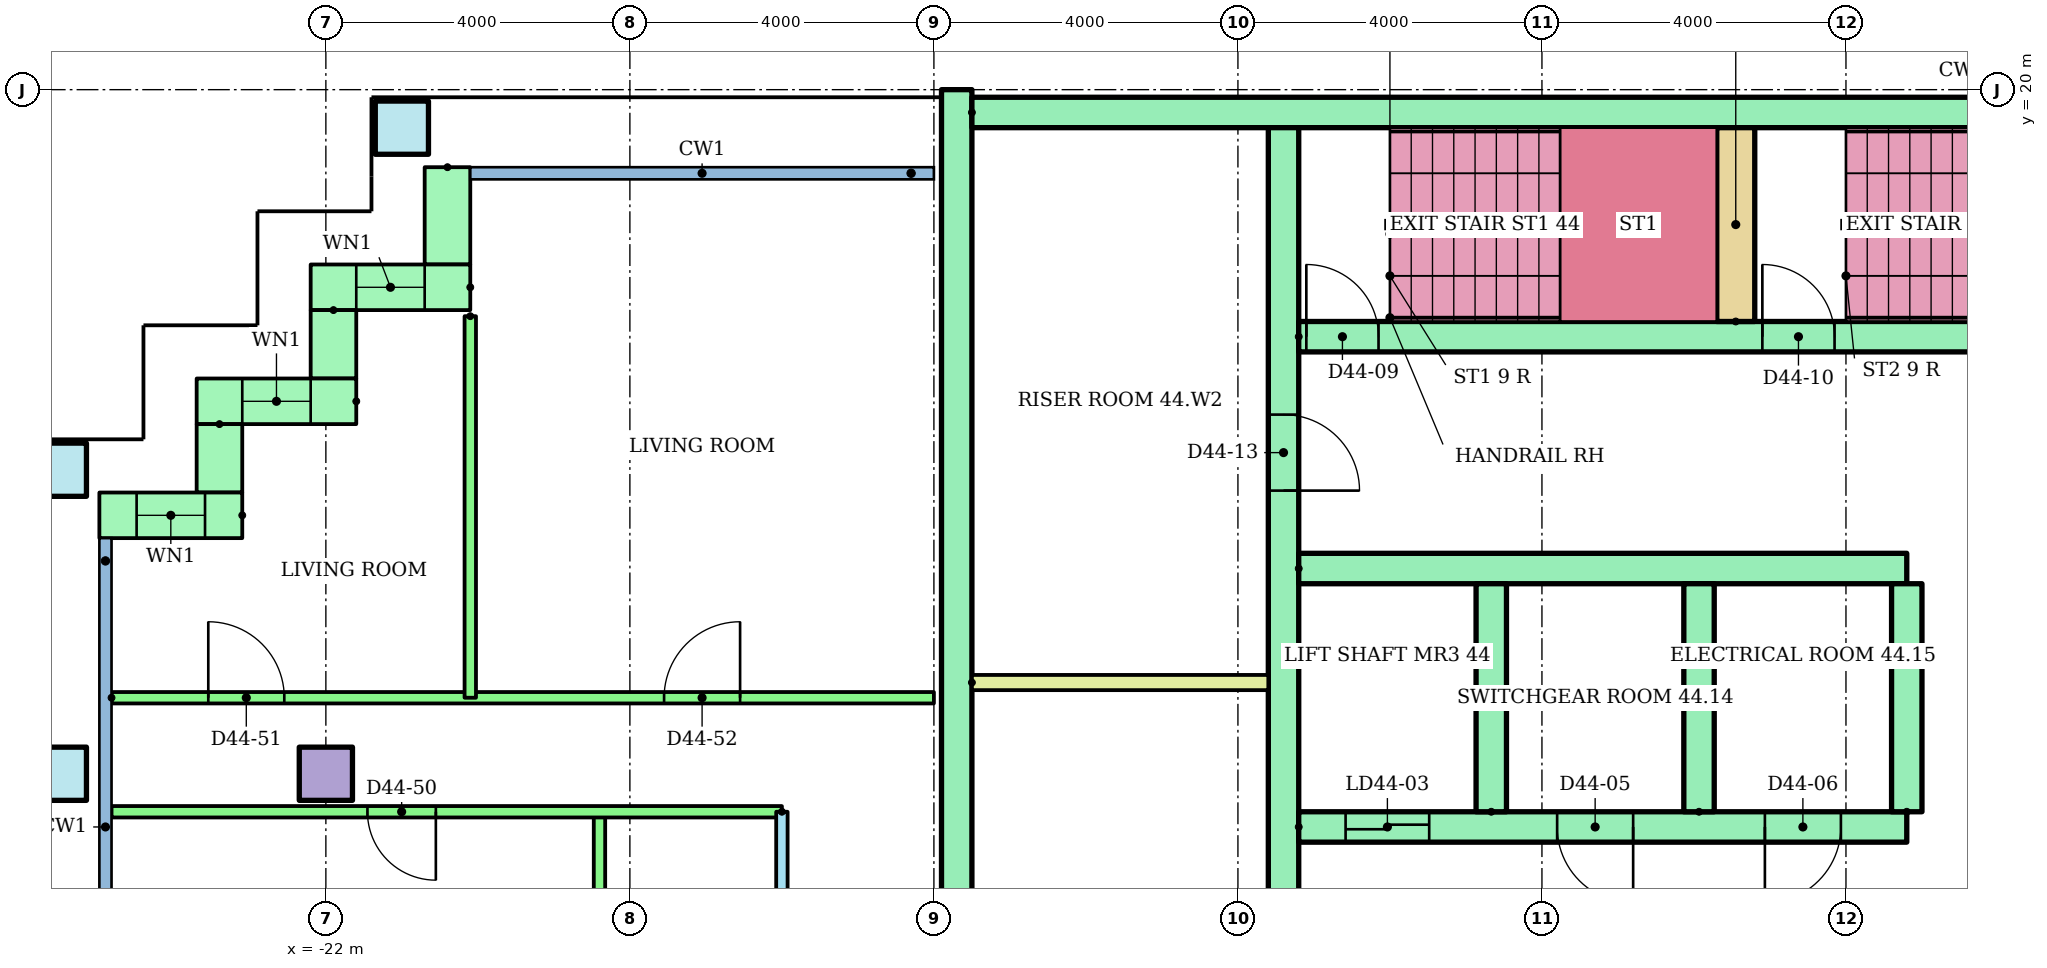
"""IFC4 building model, lengths in metres.
Left out: names, types, materials, properties, quantities, classifications, styles, units other than length and angle.
Written with IfcOpenShell. Run it as: python <this file> out.ifc"""

import sys

from ifc_helpers import new_model, si_unit, direction, frame, frame_2d, origin, origin_2d, place, context, subcontext, project, spatial, rectangle, hollow_rectangle, extrude, element, fill, save


model = new_model("IFC4")
c1 = context("Model", 3, precision=1e-05, world=origin(), true_north=direction((0.0, 1.0)))
c2 = subcontext(c1, "Body", "Model", "MODEL_VIEW")
j1 = project(units=[si_unit("LENGTHUNIT", "METRE"), si_unit("PLANEANGLEUNIT", "RADIAN")], contexts=[c1])
p1 = place(None, origin())
s1 = spatial("IfcSite", under=j1, at=p1, CompositionType="ELEMENT")
p2 = place(p1, origin())
s2 = spatial("IfcBuilding", under=s1, at=p2, CompositionType="ELEMENT")
p3 = place(p2, frame((0.0, 0.0, 171.7)))
s3 = spatial("IfcBuildingStorey", under=s2, at=p3, CompositionType="ELEMENT", Elevation=171.7)
p4 = place(p3, frame((-25.5, 11.0, 0.0)))
e1 = element("IfcColumn", 1, at=p4, inside=s3, PredefinedType="COLUMN", context=c2, shape_type="SweptSolid", body=[
    extrude(hollow_rectangle(XDim=0.7, YDim=0.7, WallThickness=0.036, at=origin_2d()), origin(), (0.0, 0.0, 1.0), 3.2),
])
p5 = place(p3, frame((-22.0, 11.0, 0.0)))
e2 = element("IfcColumn", 2, at=p5, inside=s3, PredefinedType="COLUMN", context=c2, shape_type="SweptSolid", body=[
    extrude(rectangle(XDim=0.7, YDim=0.7, at=origin_2d()), origin(), (0.0, 0.0, 1.0), 3.2),
])
for number, where in (
    (3, (-25.5, 15.0, 0.0)),
    (4, (-21.0, 19.5, 0.0)),
):
    element("IfcColumn", number, at=place(p3, frame(where)), inside=s3, PredefinedType="COLUMN", context=c2, shape_type="SweptSolid", body=[
        extrude(hollow_rectangle(XDim=0.7, YDim=0.7, WallThickness=0.036, at=origin_2d()), origin(), (0.0, 0.0, 1.0), 3.2),
    ])
p6 = place(p3, frame((-20.4, 18.98, 0.0), z_axis=(0.0, 0.0, 1.0), x_axis=(0.0, -1.0, 0.0)))
e5 = element("IfcWall", 5, at=p6, inside=s3, PredefinedType="STANDARD", context=c2, shape_type="SweptSolid", body=[
    extrude(rectangle(XDim=1.28, YDim=0.6, at=frame_2d((0.64, 0.0))), origin(), (0.0, 0.0, 1.0), 2.92),
])
p7 = place(p3, frame((-20.1, 17.4, 0.0), z_axis=(0.0, 0.0, 1.0), x_axis=(-1.0, 0.0, 0.0)))
e6 = element("IfcWall", 6, at=p7, inside=s3, PredefinedType="STANDARD", context=c2, shape_type="SweptSolid", body=[
    extrude(rectangle(XDim=2.1, YDim=0.6, at=frame_2d((1.05, 0.0))), origin(), (0.0, 0.0, 1.0), 2.92),
])
p8 = place(p7, frame((0.6, 0.0, 0.9)))
e7 = element("IfcOpeningElement", 7, at=p8, cuts=e6, PredefinedType="OPENING", context=c2, shape_type="SweptSolid", body=[
    extrude(rectangle(XDim=0.9, YDim=1.5, at=frame_2d((0.45, 0.75))), frame((0.0, 0.31, 0.0), z_axis=(0.0, -1.0, 0.0), x_axis=(1.0, 0.0, 0.0)), (0.0, 0.0, 1.0), 0.62),
])
p9 = place(p3, frame((-21.9, 17.1, 0.0), z_axis=(0.0, 0.0, 1.0), x_axis=(0.0, -1.0, 0.0)))
e8 = element("IfcWall", 8, at=p9, inside=s3, PredefinedType="STANDARD", context=c2, shape_type="SweptSolid", body=[
    extrude(rectangle(XDim=0.9, YDim=0.6, at=frame_2d((0.45, 0.0))), origin(), (0.0, 0.0, 1.0), 2.92),
])
p10 = place(p3, frame((-21.6, 15.9, 0.0), z_axis=(0.0, 0.0, 1.0), x_axis=(-1.0, 0.0, 0.0)))
e9 = element("IfcWall", 9, at=p10, inside=s3, PredefinedType="STANDARD", context=c2, shape_type="SweptSolid", body=[
    extrude(rectangle(XDim=2.1, YDim=0.6, at=frame_2d((1.05, 0.0))), origin(), (0.0, 0.0, 1.0), 2.92),
])
p11 = place(p10, frame((0.6, 0.0, 0.9)))
e10 = element("IfcOpeningElement", 10, at=p11, cuts=e9, PredefinedType="OPENING", context=c2, shape_type="SweptSolid", body=[
    extrude(rectangle(XDim=0.9, YDim=1.5, at=frame_2d((0.45, 0.75))), frame((0.0, 0.31, 0.0), z_axis=(0.0, -1.0, 0.0), x_axis=(1.0, 0.0, 0.0)), (0.0, 0.0, 1.0), 0.62),
])
p12 = place(p3, frame((-23.4, 15.6, 0.0), z_axis=(0.0, 0.0, 1.0), x_axis=(0.0, -1.0, 0.0)))
e11 = element("IfcWall", 11, at=p12, inside=s3, PredefinedType="STANDARD", context=c2, shape_type="SweptSolid", body=[
    extrude(rectangle(XDim=0.9, YDim=0.6, at=frame_2d((0.45, 0.0))), origin(), (0.0, 0.0, 1.0), 2.92),
])
p13 = place(p3, frame((-23.1, 14.4, 0.0), z_axis=(0.0, 0.0, 1.0), x_axis=(-1.0, 0.0, 0.0)))
e12 = element("IfcWall", 12, at=p13, inside=s3, PredefinedType="STANDARD", context=c2, shape_type="SweptSolid", body=[
    extrude(rectangle(XDim=1.88, YDim=0.6, at=frame_2d((0.94, 0.0))), origin(), (0.0, 0.0, 1.0), 2.92),
])
p14 = place(p13, frame((0.49, 0.0, 0.9)))
e13 = element("IfcOpeningElement", 13, at=p14, cuts=e12, PredefinedType="OPENING", context=c2, shape_type="SweptSolid", body=[
    extrude(rectangle(XDim=0.9, YDim=1.5, at=frame_2d((0.45, 0.75))), frame((0.0, 0.31, 0.0), z_axis=(0.0, -1.0, 0.0), x_axis=(1.0, 0.0, 0.0)), (0.0, 0.0, 1.0), 0.62),
])
p15 = place(p3, frame((-13.7, 3.0, 0.0), z_axis=(0.0, 0.0, 1.0), x_axis=(0.0, 1.0, 0.0)))
e14 = element("IfcWall", 14, at=p15, inside=s3, PredefinedType="SHEAR", context=c2, shape_type="SweptSolid", body=[
    extrude(rectangle(XDim=17.0, YDim=0.4, at=frame_2d((8.5, 0.0))), origin(), (0.0, 0.0, 1.0), 2.92),
])
p16 = place(p3, frame((-13.5, 19.7, 0.0)))
e15 = element("IfcWall", 15, at=p16, inside=s3, PredefinedType="SHEAR", context=c2, shape_type="SweptSolid", body=[
    extrude(rectangle(XDim=27.0, YDim=0.4, at=frame_2d((13.5, 0.0))), origin(), (0.0, 0.0, 1.0), 2.92),
])
p17 = place(p3, frame((-9.4, 6.8, 0.0), z_axis=(0.0, 0.0, 1.0), x_axis=(0.0, 1.0, 0.0)))
e16 = element("IfcWall", 16, at=p17, inside=s3, PredefinedType="SHEAR", context=c2, shape_type="SweptSolid", body=[
    extrude(rectangle(XDim=12.7, YDim=0.4, at=frame_2d((6.35, 0.0))), origin(), (0.0, 0.0, 1.0), 2.92),
])
p18 = place(p17, frame((1.15, 0.0, 0.0)))
e17 = element("IfcOpeningElement", 17, at=p18, cuts=e16, PredefinedType="OPENING", context=c2, shape_type="SweptSolid", body=[
    extrude(rectangle(XDim=1.0, YDim=2.1, at=frame_2d((0.5, 1.05))), frame((0.0, 0.21, 0.0), z_axis=(0.0, -1.0, 0.0), x_axis=(1.0, 0.0, 0.0)), (0.0, 0.0, 1.0), 0.42),
])
p19 = place(p17, frame((7.925, 0.0, 0.0)))
e18 = element("IfcOpeningElement", 18, at=p19, cuts=e16, PredefinedType="OPENING", context=c2, shape_type="SweptSolid", body=[
    extrude(rectangle(XDim=1.0, YDim=2.1, at=frame_2d((0.5, 1.05))), frame((0.0, 0.21, 0.0), z_axis=(0.0, -1.0, 0.0), x_axis=(1.0, 0.0, 0.0)), (0.0, 0.0, 1.0), 0.42),
])
p20 = place(p3, frame((-9.2, 10.3, 0.0)))
e19 = element("IfcWall", 19, at=p20, inside=s3, PredefinedType="SHEAR", context=c2, shape_type="SweptSolid", body=[
    extrude(rectangle(XDim=8.0, YDim=0.4, at=frame_2d((4.0, 0.0))), origin(), (0.0, 0.0, 1.0), 2.92),
])
p21 = place(p20, frame((0.617, 0.0, 0.0)))
e20 = element("IfcOpeningElement", 20, at=p21, cuts=e19, PredefinedType="OPENING", context=c2, shape_type="SweptSolid", body=[
    extrude(rectangle(XDim=1.1, YDim=2.1, at=frame_2d((0.55, 1.05))), frame((0.0, 0.21, 0.0), z_axis=(0.0, -1.0, 0.0), x_axis=(1.0, 0.0, 0.0)), (0.0, 0.0, 1.0), 0.42),
])
p22 = place(p20, frame((3.4, 0.0, 0.0)))
e21 = element("IfcOpeningElement", 21, at=p22, cuts=e19, PredefinedType="OPENING", context=c2, shape_type="SweptSolid", body=[
    extrude(rectangle(XDim=1.0, YDim=2.1, at=frame_2d((0.5, 1.05))), frame((0.0, 0.21, 0.0), z_axis=(0.0, -1.0, 0.0), x_axis=(1.0, 0.0, 0.0)), (0.0, 0.0, 1.0), 0.42),
])
p23 = place(p20, frame((6.133, 0.0, 0.0)))
e22 = element("IfcOpeningElement", 22, at=p23, cuts=e19, PredefinedType="OPENING", context=c2, shape_type="SweptSolid", body=[
    extrude(rectangle(XDim=1.0, YDim=2.1, at=frame_2d((0.5, 1.05))), frame((0.0, 0.21, 0.0), z_axis=(0.0, -1.0, 0.0), x_axis=(1.0, 0.0, 0.0)), (0.0, 0.0, 1.0), 0.42),
])
p24 = place(p3, frame((-9.2, 13.7, 0.0)))
e23 = element("IfcWall", 23, at=p24, inside=s3, PredefinedType="SHEAR", context=c2, shape_type="SweptSolid", body=[
    extrude(rectangle(XDim=8.0, YDim=0.4, at=frame_2d((4.0, 0.0))), origin(), (0.0, 0.0, 1.0), 2.92),
])
for number, where, z_axis, x_axis in (
    (24, (-6.667, 10.5, 0.0), (0.0, 0.0, 1.0), (0.0, 1.0, 0.0)),
    (25, (-3.933, 10.5, 0.0), (0.0, 0.0, 1.0), (0.0, 1.0, 0.0)),
    (26, (-1.2, 10.5, 0.0), (0.0, 0.0, 1.0), (0.0, 1.0, 0.0)),
):
    element("IfcWall", number, at=place(p3, frame(where, z_axis=z_axis, x_axis=x_axis)), inside=s3, PredefinedType="SHEAR", context=c2, shape_type="SweptSolid", body=[
        extrude(rectangle(XDim=3.0, YDim=0.4, at=frame_2d((1.5, 0.0))), origin(), (0.0, 0.0, 1.0), 2.92),
    ])
p25 = place(p3, frame((-9.2, 16.75, 0.0)))
e27 = element("IfcWall", 27, at=p25, inside=s3, PredefinedType="SHEAR", context=c2, shape_type="SweptSolid", body=[
    extrude(rectangle(XDim=18.4, YDim=0.4, at=frame_2d((9.2, 0.0))), origin(), (0.0, 0.0, 1.0), 2.92),
])
p26 = place(p25, frame((0.1, 0.0, 0.0)))
e28 = element("IfcOpeningElement", 28, at=p26, cuts=e27, PredefinedType="OPENING", context=c2, shape_type="SweptSolid", body=[
    extrude(rectangle(XDim=0.95, YDim=2.1, at=frame_2d((0.475, 1.05))), frame((0.0, 0.21, 0.0), z_axis=(0.0, -1.0, 0.0), x_axis=(1.0, 0.0, 0.0)), (0.0, 0.0, 1.0), 0.42),
])
p27 = place(p25, frame((6.1, 0.0, 0.0)))
e29 = element("IfcOpeningElement", 29, at=p27, cuts=e27, PredefinedType="OPENING", context=c2, shape_type="SweptSolid", body=[
    extrude(rectangle(XDim=0.95, YDim=2.1, at=frame_2d((0.475, 1.05))), frame((0.0, 0.21, 0.0), z_axis=(0.0, -1.0, 0.0), x_axis=(1.0, 0.0, 0.0)), (0.0, 0.0, 1.0), 0.42),
])
p28 = place(p25, frame((12.1, 0.0, 0.0)))
e30 = element("IfcOpeningElement", 30, at=p28, cuts=e27, PredefinedType="OPENING", context=c2, shape_type="SweptSolid", body=[
    extrude(rectangle(XDim=0.95, YDim=2.1, at=frame_2d((0.475, 1.05))), frame((0.0, 0.21, 0.0), z_axis=(0.0, -1.0, 0.0), x_axis=(1.0, 0.0, 0.0)), (0.0, 0.0, 1.0), 0.42),
])
p29 = place(p3, frame((-3.45, 16.95, 0.0), z_axis=(0.0, 0.0, 1.0), x_axis=(0.0, 1.0, 0.0)))
e31 = element("IfcWall", 31, at=p29, inside=s3, PredefinedType="SHEAR", context=c2, shape_type="SweptSolid", body=[
    extrude(rectangle(XDim=2.55, YDim=0.5, at=frame_2d((1.275, 0.0))), origin(), (0.0, 0.0, 1.0), 2.92),
])
p30 = place(p3, frame((-13.5, 12.2, 0.0)))
e32 = element("IfcWall", 32, at=p30, inside=s3, PredefinedType="PARTITIONING", context=c2, shape_type="SweptSolid", body=[
    extrude(rectangle(XDim=3.9, YDim=0.2, at=frame_2d((1.95, 0.0))), origin(), (0.0, 0.0, 1.0), 2.92),
])
p31 = place(p3, frame((-16.0, 1.4, 0.0), z_axis=(0.0, 0.0, 1.0), x_axis=(0.0, 1.0, 0.0)))
e33 = element("IfcWall", 33, at=p31, inside=s3, PredefinedType="PARTITIONING", context=c2, shape_type="SweptSolid", body=[
    extrude(rectangle(XDim=9.1, YDim=0.15, at=frame_2d((4.55, 0.0))), origin(), (0.0, 0.0, 1.0), 2.4),
])
p32 = place(p31, frame((2.05, 0.0, 0.0)))
e34 = element("IfcOpeningElement", 34, at=p32, cuts=e33, PredefinedType="OPENING", context=c2, shape_type="SweptSolid", body=[
    extrude(rectangle(XDim=0.9, YDim=2.1, at=frame_2d((0.45, 1.05))), frame((0.0, 0.085, 0.0), z_axis=(0.0, -1.0, 0.0), x_axis=(1.0, 0.0, 0.0)), (0.0, 0.0, 1.0), 0.17),
])
p33 = place(p31, frame((6.65, 0.0, 0.0)))
e35 = element("IfcOpeningElement", 35, at=p33, cuts=e33, PredefinedType="OPENING", context=c2, shape_type="SweptSolid", body=[
    extrude(rectangle(XDim=0.8, YDim=2.1, at=frame_2d((0.4, 1.05))), frame((0.0, 0.085, 0.0), z_axis=(0.0, -1.0, 0.0), x_axis=(1.0, 0.0, 0.0)), (0.0, 0.0, 1.0), 0.17),
])
p34 = place(p3, frame((-18.4, 1.4, 0.0), z_axis=(0.0, 0.0, 1.0), x_axis=(0.0, 1.0, 0.0)))
e36 = element("IfcWall", 36, at=p34, inside=s3, PredefinedType="PARTITIONING", context=c2, shape_type="SweptSolid", body=[
    extrude(rectangle(XDim=9.1, YDim=0.15, at=frame_2d((4.55, 0.0))), origin(), (0.0, 0.0, 1.0), 2.4),
])
p35 = place(p3, frame((-16.0, 10.5, 0.0), z_axis=(0.0, 0.0, 1.0), x_axis=(-1.0, 0.0, 0.0)))
e37 = element("IfcWall", 37, at=p35, inside=s3, PredefinedType="PARTITIONING", context=c2, shape_type="SweptSolid", body=[
    extrude(rectangle(XDim=8.82, YDim=0.15, at=frame_2d((4.41, 0.0))), origin(), (0.0, 0.0, 1.0), 2.4),
])
p36 = place(p35, frame((4.553, 0.0, 0.0)))
e38 = element("IfcOpeningElement", 38, at=p36, cuts=e37, PredefinedType="OPENING", context=c2, shape_type="SweptSolid", body=[
    extrude(rectangle(XDim=0.9, YDim=2.1, at=frame_2d((0.45, 1.05))), frame((0.0, 0.085, 0.0), z_axis=(0.0, -1.0, 0.0), x_axis=(1.0, 0.0, 0.0)), (0.0, 0.0, 1.0), 0.17),
])
p37 = place(p3, frame((-24.82, 12.0, 0.0)))
e39 = element("IfcWall", 39, at=p37, inside=s3, PredefinedType="PARTITIONING", context=c2, shape_type="SweptSolid", body=[
    extrude(rectangle(XDim=10.82, YDim=0.15, at=frame_2d((5.41, 0.0))), origin(), (0.0, 0.0, 1.0), 2.4),
])
p38 = place(p37, frame((1.273, 0.0, 0.0)))
e40 = element("IfcOpeningElement", 40, at=p38, cuts=e39, PredefinedType="OPENING", context=c2, shape_type="SweptSolid", body=[
    extrude(rectangle(XDim=1.0, YDim=2.1, at=frame_2d((0.5, 1.05))), frame((0.0, 0.085, 0.0), z_axis=(0.0, -1.0, 0.0), x_axis=(1.0, 0.0, 0.0)), (0.0, 0.0, 1.0), 0.17),
])
p39 = place(p37, frame((7.27, 0.0, 0.0)))
e41 = element("IfcOpeningElement", 41, at=p39, cuts=e39, PredefinedType="OPENING", context=c2, shape_type="SweptSolid", body=[
    extrude(rectangle(XDim=1.0, YDim=2.1, at=frame_2d((0.5, 1.05))), frame((0.0, 0.085, 0.0), z_axis=(0.0, -1.0, 0.0), x_axis=(1.0, 0.0, 0.0)), (0.0, 0.0, 1.0), 0.17),
])
p40 = place(p3, frame((-20.1, 17.02, 0.0), z_axis=(0.0, 0.0, 1.0), x_axis=(0.0, -1.0, 0.0)))
e42 = element("IfcWall", 42, at=p40, inside=s3, PredefinedType="PARTITIONING", context=c2, shape_type="SweptSolid", body=[
    extrude(rectangle(XDim=5.02, YDim=0.15, at=frame_2d((2.51, 0.0))), origin(), (0.0, 0.0, 1.0), 2.4),
])
p41 = place(p8, origin())
e43 = element("IfcWindow", 43, at=p41, inside=s3, PartitioningType="SINGLE_PANEL", PredefinedType="WINDOW", context=c2, shape_type="SweptSolid", body=[
    extrude(rectangle(XDim=0.9, YDim=1.5, at=frame_2d((0.45, 0.75))), frame((0.0, 0.03, 0.0), z_axis=(0.0, -1.0, 0.0), x_axis=(1.0, 0.0, 0.0)), (0.0, 0.0, 1.0), 0.06),
])
fill(e7, e43)
p42 = place(p11, origin())
e44 = element("IfcWindow", 44, at=p42, inside=s3, PartitioningType="SINGLE_PANEL", PredefinedType="WINDOW", context=c2, shape_type="SweptSolid", body=[
    extrude(rectangle(XDim=0.9, YDim=1.5, at=frame_2d((0.45, 0.75))), frame((0.0, 0.03, 0.0), z_axis=(0.0, -1.0, 0.0), x_axis=(1.0, 0.0, 0.0)), (0.0, 0.0, 1.0), 0.06),
])
fill(e10, e44)
p43 = place(p14, origin())
e45 = element("IfcWindow", 45, at=p43, inside=s3, PartitioningType="SINGLE_PANEL", PredefinedType="WINDOW", context=c2, shape_type="SweptSolid", body=[
    extrude(rectangle(XDim=0.9, YDim=1.5, at=frame_2d((0.45, 0.75))), frame((0.0, 0.03, 0.0), z_axis=(0.0, -1.0, 0.0), x_axis=(1.0, 0.0, 0.0)), (0.0, 0.0, 1.0), 0.06),
])
fill(e13, e45)
p44 = place(p21, origin())
e46 = element("IfcDoor", 46, at=p44, inside=s3, OperationType="SLIDING_TO_LEFT", PredefinedType="DOOR", context=c2, shape_type="SweptSolid", body=[
    extrude(rectangle(XDim=1.1, YDim=2.1, at=frame_2d((0.55, 1.05))), frame((0.0, 0.025, 0.0), z_axis=(0.0, -1.0, 0.0), x_axis=(1.0, 0.0, 0.0)), (0.0, 0.0, 1.0), 0.05),
])
fill(e20, e46)
p45 = place(p22, frame((1.0, 0.0, 0.0), z_axis=(0.0, 0.0, 1.0), x_axis=(-1.0, 0.0, 0.0)))
e47 = element("IfcDoor", 47, at=p45, inside=s3, OperationType="SINGLE_SWING_RIGHT", PredefinedType="DOOR", context=c2, shape_type="SweptSolid", body=[
    extrude(rectangle(XDim=1.0, YDim=2.1, at=frame_2d((0.5, 1.05))), frame((0.0, 0.025, 0.0), z_axis=(0.0, -1.0, 0.0), x_axis=(1.0, 0.0, 0.0)), (0.0, 0.0, 1.0), 0.05),
])
fill(e21, e47)
p46 = place(p23, frame((1.0, 0.0, 0.0), z_axis=(0.0, 0.0, 1.0), x_axis=(-1.0, 0.0, 0.0)))
e48 = element("IfcDoor", 48, at=p46, inside=s3, OperationType="SINGLE_SWING_LEFT", PredefinedType="DOOR", context=c2, shape_type="SweptSolid", body=[
    extrude(rectangle(XDim=1.0, YDim=2.1, at=frame_2d((0.5, 1.05))), frame((0.0, 0.025, 0.0), z_axis=(0.0, -1.0, 0.0), x_axis=(1.0, 0.0, 0.0)), (0.0, 0.0, 1.0), 0.05),
])
fill(e22, e48)
p47 = place(p26, origin())
e49 = element("IfcDoor", 49, at=p47, inside=s3, OperationType="SINGLE_SWING_LEFT", PredefinedType="DOOR", context=c2, shape_type="SweptSolid", body=[
    extrude(rectangle(XDim=0.95, YDim=2.1, at=frame_2d((0.475, 1.05))), frame((0.0, 0.025, 0.0), z_axis=(0.0, -1.0, 0.0), x_axis=(1.0, 0.0, 0.0)), (0.0, 0.0, 1.0), 0.05),
])
fill(e28, e49)
p48 = place(p27, origin())
e50 = element("IfcDoor", 50, at=p48, inside=s3, OperationType="SINGLE_SWING_LEFT", PredefinedType="DOOR", context=c2, shape_type="SweptSolid", body=[
    extrude(rectangle(XDim=0.95, YDim=2.1, at=frame_2d((0.475, 1.05))), frame((0.0, 0.025, 0.0), z_axis=(0.0, -1.0, 0.0), x_axis=(1.0, 0.0, 0.0)), (0.0, 0.0, 1.0), 0.05),
])
fill(e29, e50)
p49 = place(p19, frame((1.0, 0.0, 0.0), z_axis=(0.0, 0.0, 1.0), x_axis=(-1.0, 0.0, 0.0)))
e51 = element("IfcDoor", 51, at=p49, inside=s3, OperationType="SINGLE_SWING_LEFT", PredefinedType="DOOR", context=c2, shape_type="SweptSolid", body=[
    extrude(rectangle(XDim=1.0, YDim=2.1, at=frame_2d((0.5, 1.05))), frame((0.0, 0.025, 0.0), z_axis=(0.0, -1.0, 0.0), x_axis=(1.0, 0.0, 0.0)), (0.0, 0.0, 1.0), 0.05),
])
fill(e18, e51)
p50 = place(p36, origin())
e52 = element("IfcDoor", 52, at=p50, inside=s3, OperationType="SINGLE_SWING_LEFT", PredefinedType="DOOR", context=c2, shape_type="SweptSolid", body=[
    extrude(rectangle(XDim=0.9, YDim=2.1, at=frame_2d((0.45, 1.05))), frame((0.0, 0.025, 0.0), z_axis=(0.0, -1.0, 0.0), x_axis=(1.0, 0.0, 0.0)), (0.0, 0.0, 1.0), 0.05),
])
fill(e38, e52)
p51 = place(p38, origin())
e53 = element("IfcDoor", 53, at=p51, inside=s3, OperationType="SINGLE_SWING_LEFT", PredefinedType="DOOR", context=c2, shape_type="SweptSolid", body=[
    extrude(rectangle(XDim=1.0, YDim=2.1, at=frame_2d((0.5, 1.05))), frame((0.0, 0.025, 0.0), z_axis=(0.0, -1.0, 0.0), x_axis=(1.0, 0.0, 0.0)), (0.0, 0.0, 1.0), 0.05),
])
fill(e40, e53)
p52 = place(p39, origin())
e54 = element("IfcDoor", 54, at=p52, inside=s3, OperationType="SINGLE_SWING_RIGHT", PredefinedType="DOOR", context=c2, shape_type="SweptSolid", body=[
    extrude(rectangle(XDim=1.0, YDim=2.1, at=frame_2d((0.5, 1.05))), frame((0.0, 0.025, 0.0), z_axis=(0.0, -1.0, 0.0), x_axis=(1.0, 0.0, 0.0)), (0.0, 0.0, 1.0), 0.05),
])
fill(e41, e54)
save(model, sys.argv[1])
